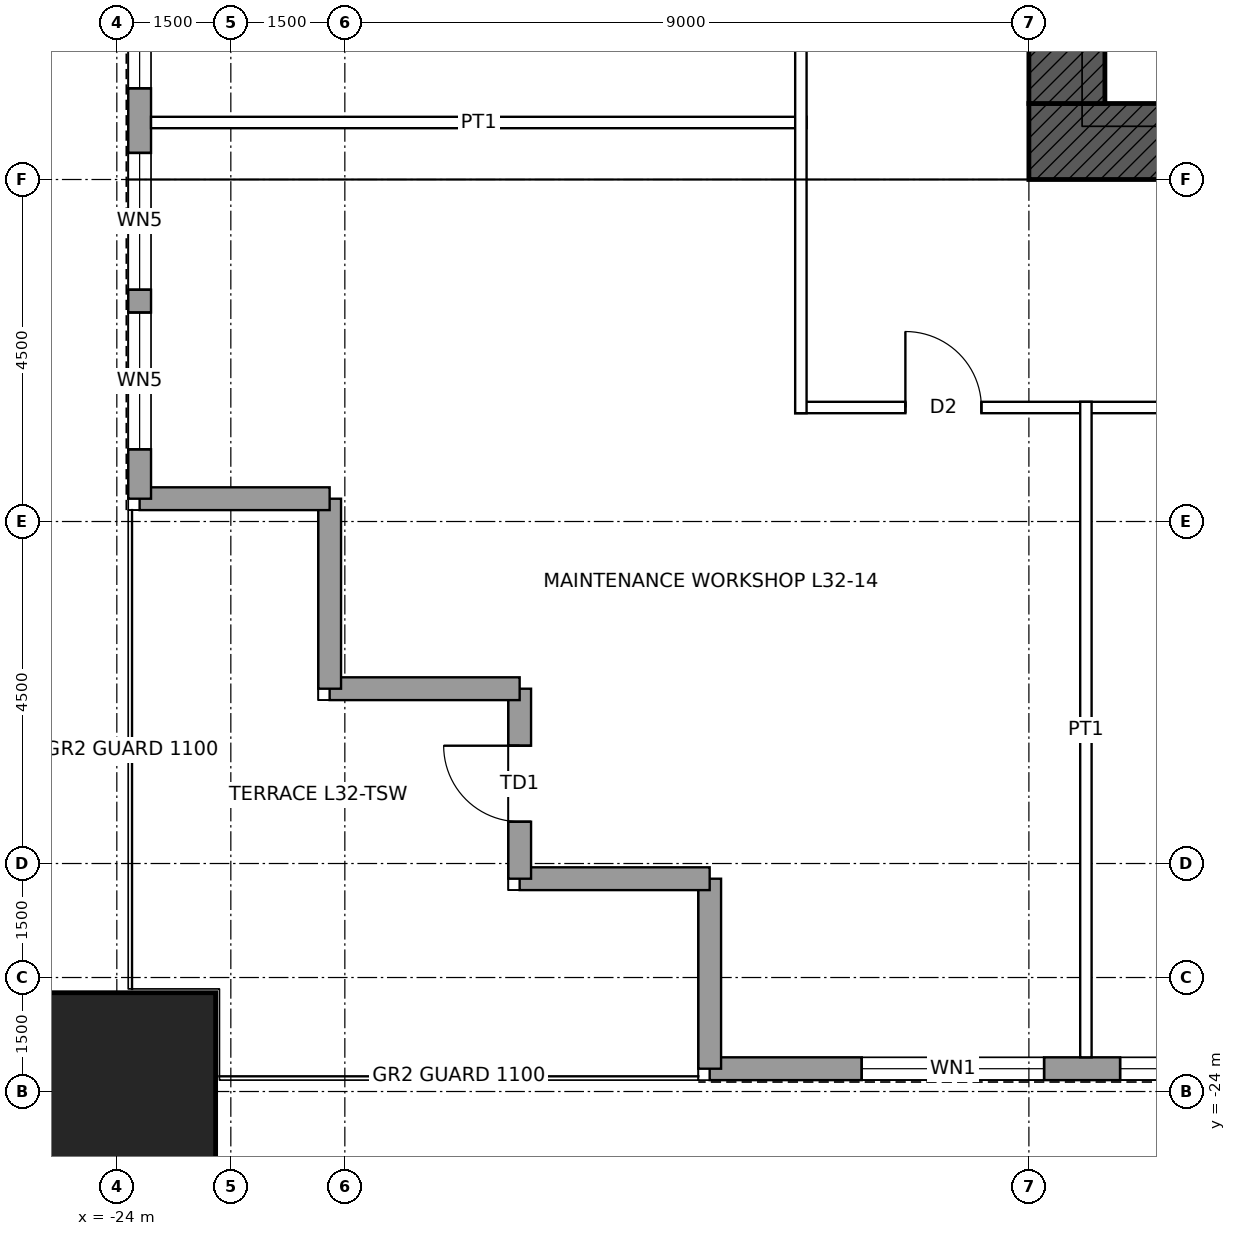
"""IFC4 building model, lengths in metres.
Left out: names, types, materials, properties, quantities, classifications, styles, units other than length and angle.
Written with IfcOpenShell. Run it as: python <this file> out.ifc"""

import sys

from ifc_helpers import new_model, si_unit, direction, frame, frame_2d, origin, origin_2d, place, context, subcontext, project, spatial, rectangle, hollow_rectangle, extrude, element, fill, save


model = new_model("IFC4")
c1 = context("Model", 3, precision=1e-05, world=origin(), true_north=direction((0.0, 1.0)))
c2 = subcontext(c1, "Body", "Model", "MODEL_VIEW")
j1 = project(units=[si_unit("LENGTHUNIT", "METRE"), si_unit("PLANEANGLEUNIT", "RADIAN")], contexts=[c1])
p1 = place(None, origin())
s1 = spatial("IfcSite", under=j1, at=p1, CompositionType="ELEMENT")
p2 = place(p1, origin())
s2 = spatial("IfcBuilding", under=s1, at=p2, CompositionType="ELEMENT")
p3 = place(p2, frame((0.0, 0.0, 158.4)))
s3 = spatial("IfcBuildingStorey", under=s2, at=p3, CompositionType="ELEMENT", Elevation=158.4)
p4 = place(p3, frame((-24.0, -24.0, 0.0), z_axis=(0.0, 0.0, 1.0), x_axis=(1.0, 0.0, 0.0)))
e1 = element("IfcColumn", 1, at=p4, inside=s3, PredefinedType="COLUMN", context=c2, shape_type="SweptSolid", body=[
    extrude(hollow_rectangle(XDim=2.6, YDim=2.6, WallThickness=0.13, at=origin_2d()), origin(), (0.0, 0.0, 1.0), 4.5),
])
p5 = place(p3, frame((12.0, -11.5, 0.0), z_axis=(0.0, 0.0, 1.0), x_axis=(-1.0, 0.0, 0.0)))
e2 = element("IfcWall", 2, at=p5, inside=s3, PredefinedType="SHEAR", context=c2, shape_type="SweptSolid", body=[
    extrude(rectangle(XDim=24.0, YDim=1.0, at=frame_2d((12.0, 0.0))), origin(), (0.0, 0.0, 1.0), 4.5),
])
p6 = place(p5, frame((11.5, 0.0, 0.0)))
e3 = element("IfcOpeningElement", 3, at=p6, cuts=e2, PredefinedType="OPENING", context=c2, shape_type="SweptSolid", body=[
    extrude(rectangle(XDim=1.0, YDim=2.1, at=frame_2d((0.5, 1.05))), frame((0.0, 0.51, 0.0), z_axis=(0.0, -1.0, 0.0), x_axis=(1.0, 0.0, 0.0)), (0.0, 0.0, 1.0), 1.02),
])
p7 = place(p5, frame((1.0, 0.0, 0.0)))
e4 = element("IfcOpeningElement", 4, at=p7, cuts=e2, PredefinedType="OPENING", context=c2, shape_type="SweptSolid", body=[
    extrude(rectangle(XDim=1.0, YDim=2.4, at=frame_2d((0.5, 1.2))), frame((0.0, 0.51, 0.0), z_axis=(0.0, -1.0, 0.0), x_axis=(1.0, 0.0, 0.0)), (0.0, 0.0, 1.0), 1.02),
])
p8 = place(p3, frame((-11.5, -11.0, 0.0), z_axis=(0.0, 0.0, 1.0), x_axis=(0.0, 1.0, 0.0)))
e5 = element("IfcWall", 5, at=p8, inside=s3, PredefinedType="SHEAR", context=c2, shape_type="SweptSolid", body=[
    extrude(rectangle(XDim=22.0, YDim=1.0, at=frame_2d((11.0, 0.0))), origin(), (0.0, 0.0, 1.0), 4.5),
])
p9 = place(p8, frame((10.5, 0.0, 0.0)))
e6 = element("IfcOpeningElement", 6, at=p9, cuts=e5, PredefinedType="OPENING", context=c2, shape_type="SweptSolid", body=[
    extrude(rectangle(XDim=1.0, YDim=2.4, at=frame_2d((0.5, 1.2))), frame((0.0, 0.51, 0.0), z_axis=(0.0, -1.0, 0.0), x_axis=(1.0, 0.0, 0.0)), (0.0, 0.0, 1.0), 1.02),
])
p10 = place(p3, frame((16.2, -23.7, 0.0), z_axis=(0.0, 0.0, 1.0), x_axis=(-1.0, 0.0, 0.0)))
e7 = element("IfcWall", 7, at=p10, inside=s3, PredefinedType="SOLIDWALL", context=c2, shape_type="SweptSolid", body=[
    extrude(rectangle(XDim=32.4, YDim=0.3, at=frame_2d((16.2, 0.0))), origin(), (0.0, 0.0, 1.0), 4.3),
])
p11 = place(p10, frame((0.65, 0.0, 1.0)))
e8 = element("IfcOpeningElement", 8, at=p11, cuts=e7, PredefinedType="OPENING", context=c2, shape_type="SweptSolid", body=[
    extrude(rectangle(XDim=1.8, YDim=1.2, at=frame_2d((0.9, 0.6))), frame((0.0, 0.16, 0.0), z_axis=(0.0, -1.0, 0.0), x_axis=(1.0, 0.0, 0.0)), (0.0, 0.0, 1.0), 0.32),
])
p12 = place(p10, frame((2.75, 0.0, 1.0)))
e9 = element("IfcOpeningElement", 9, at=p12, cuts=e7, PredefinedType="OPENING", context=c2, shape_type="SweptSolid", body=[
    extrude(rectangle(XDim=1.8, YDim=1.2, at=frame_2d((0.9, 0.6))), frame((0.0, 0.16, 0.0), z_axis=(0.0, -1.0, 0.0), x_axis=(1.0, 0.0, 0.0)), (0.0, 0.0, 1.0), 0.32),
])
p13 = place(p10, frame((5.4, 0.0, 1.0)))
e10 = element("IfcOpeningElement", 10, at=p13, cuts=e7, PredefinedType="OPENING", context=c2, shape_type="SweptSolid", body=[
    extrude(rectangle(XDim=2.4, YDim=1.2, at=frame_2d((1.2, 0.6))), frame((0.0, 0.16, 0.0), z_axis=(0.0, -1.0, 0.0), x_axis=(1.0, 0.0, 0.0)), (0.0, 0.0, 1.0), 0.32),
])
p14 = place(p10, frame((12.95, 0.0, 1.0)))
e11 = element("IfcOpeningElement", 11, at=p14, cuts=e7, PredefinedType="OPENING", context=c2, shape_type="SweptSolid", body=[
    extrude(rectangle(XDim=2.4, YDim=1.2, at=frame_2d((1.2, 0.6))), frame((0.0, 0.16, 0.0), z_axis=(0.0, -1.0, 0.0), x_axis=(1.0, 0.0, 0.0)), (0.0, 0.0, 1.0), 0.32),
])
p15 = place(p10, frame((15.65, 0.0, 1.0)))
e12 = element("IfcOpeningElement", 12, at=p15, cuts=e7, PredefinedType="OPENING", context=c2, shape_type="SweptSolid", body=[
    extrude(rectangle(XDim=1.8, YDim=1.2, at=frame_2d((0.9, 0.6))), frame((0.0, 0.16, 0.0), z_axis=(0.0, -1.0, 0.0), x_axis=(1.0, 0.0, 0.0)), (0.0, 0.0, 1.0), 0.32),
])
p16 = place(p10, frame((17.75, 0.0, 1.0)))
e13 = element("IfcOpeningElement", 13, at=p16, cuts=e7, PredefinedType="OPENING", context=c2, shape_type="SweptSolid", body=[
    extrude(rectangle(XDim=1.8, YDim=1.2, at=frame_2d((0.9, 0.6))), frame((0.0, 0.16, 0.0), z_axis=(0.0, -1.0, 0.0), x_axis=(1.0, 0.0, 0.0)), (0.0, 0.0, 1.0), 0.32),
])
p17 = place(p10, frame((24.6, 0.0, 1.0)))
e14 = element("IfcOpeningElement", 14, at=p17, cuts=e7, PredefinedType="OPENING", context=c2, shape_type="SweptSolid", body=[
    extrude(rectangle(XDim=2.4, YDim=1.2, at=frame_2d((1.2, 0.6))), frame((0.0, 0.16, 0.0), z_axis=(0.0, -1.0, 0.0), x_axis=(1.0, 0.0, 0.0)), (0.0, 0.0, 1.0), 0.32),
])
p18 = place(p10, frame((28.0, 0.0, 1.0)))
e15 = element("IfcOpeningElement", 15, at=p18, cuts=e7, PredefinedType="OPENING", context=c2, shape_type="SweptSolid", body=[
    extrude(rectangle(XDim=2.4, YDim=1.2, at=frame_2d((1.2, 0.6))), frame((0.0, 0.16, 0.0), z_axis=(0.0, -1.0, 0.0), x_axis=(1.0, 0.0, 0.0)), (0.0, 0.0, 1.0), 0.32),
])
for number, where, z_axis, x_axis in (
    (16, (-16.2, -23.7, 0.0), (0.0, 0.0, 1.0), (0.0, 1.0, 0.0)),
    (17, (-16.2, -21.2, 0.0), (0.0, 0.0, 1.0), (-1.0, 0.0, 0.0)),
):
    element("IfcWall", number, at=place(p3, frame(where, z_axis=z_axis, x_axis=x_axis)), inside=s3, PredefinedType="SOLIDWALL", context=c2, shape_type="SweptSolid", body=[
        extrude(rectangle(XDim=2.5, YDim=0.3, at=frame_2d((1.25, 0.0))), origin(), (0.0, 0.0, 1.0), 4.3),
    ])
p19 = place(p3, frame((-18.7, -21.2, 0.0), z_axis=(0.0, 0.0, 1.0), x_axis=(0.0, 1.0, 0.0)))
e18 = element("IfcWall", 18, at=p19, inside=s3, PredefinedType="SOLIDWALL", context=c2, shape_type="SweptSolid", body=[
    extrude(rectangle(XDim=2.5, YDim=0.3, at=frame_2d((1.25, 0.0))), origin(), (0.0, 0.0, 1.0), 4.3),
])
p20 = place(p19, frame((0.75, 0.0, 0.0)))
e19 = element("IfcOpeningElement", 19, at=p20, cuts=e18, PredefinedType="OPENING", context=c2, shape_type="SweptSolid", body=[
    extrude(rectangle(XDim=1.0, YDim=2.4, at=frame_2d((0.5, 1.2))), frame((0.0, 0.16, 0.0), z_axis=(0.0, -1.0, 0.0), x_axis=(1.0, 0.0, 0.0)), (0.0, 0.0, 1.0), 0.32),
])
for number, where, z_axis, x_axis in (
    (20, (-18.7, -18.7, 0.0), (0.0, 0.0, 1.0), (-1.0, 0.0, 0.0)),
    (21, (-21.2, -18.7, 0.0), (0.0, 0.0, 1.0), (0.0, 1.0, 0.0)),
    (22, (-21.2, -16.2, 0.0), (0.0, 0.0, 1.0), (-1.0, 0.0, 0.0)),
):
    element("IfcWall", number, at=place(p3, frame(where, z_axis=z_axis, x_axis=x_axis)), inside=s3, PredefinedType="SOLIDWALL", context=c2, shape_type="SweptSolid", body=[
        extrude(rectangle(XDim=2.5, YDim=0.3, at=frame_2d((1.25, 0.0))), origin(), (0.0, 0.0, 1.0), 4.3),
    ])
p21 = place(p3, frame((-23.7, -16.2, 0.0), z_axis=(0.0, 0.0, 1.0), x_axis=(0.0, 1.0, 0.0)))
e23 = element("IfcWall", 23, at=p21, inside=s3, PredefinedType="SOLIDWALL", context=c2, shape_type="SweptSolid", body=[
    extrude(rectangle(XDim=32.4, YDim=0.3, at=frame_2d((16.2, 0.0))), origin(), (0.0, 0.0, 1.0), 4.3),
])
p22 = place(p21, frame((0.65, 0.0, 1.0)))
e24 = element("IfcOpeningElement", 24, at=p22, cuts=e23, PredefinedType="OPENING", context=c2, shape_type="SweptSolid", body=[
    extrude(rectangle(XDim=1.8, YDim=1.2, at=frame_2d((0.9, 0.6))), frame((0.0, 0.16, 0.0), z_axis=(0.0, -1.0, 0.0), x_axis=(1.0, 0.0, 0.0)), (0.0, 0.0, 1.0), 0.32),
])
p23 = place(p21, frame((2.75, 0.0, 1.0)))
e25 = element("IfcOpeningElement", 25, at=p23, cuts=e23, PredefinedType="OPENING", context=c2, shape_type="SweptSolid", body=[
    extrude(rectangle(XDim=1.8, YDim=1.2, at=frame_2d((0.9, 0.6))), frame((0.0, 0.16, 0.0), z_axis=(0.0, -1.0, 0.0), x_axis=(1.0, 0.0, 0.0)), (0.0, 0.0, 1.0), 0.32),
])
p24 = place(p21, frame((5.4, 0.0, 1.0)))
e26 = element("IfcOpeningElement", 26, at=p24, cuts=e23, PredefinedType="OPENING", context=c2, shape_type="SweptSolid", body=[
    extrude(rectangle(XDim=2.4, YDim=1.2, at=frame_2d((1.2, 0.6))), frame((0.0, 0.16, 0.0), z_axis=(0.0, -1.0, 0.0), x_axis=(1.0, 0.0, 0.0)), (0.0, 0.0, 1.0), 0.32),
])
p25 = place(p21, frame((12.95, 0.0, 1.0)))
e27 = element("IfcOpeningElement", 27, at=p25, cuts=e23, PredefinedType="OPENING", context=c2, shape_type="SweptSolid", body=[
    extrude(rectangle(XDim=2.4, YDim=1.2, at=frame_2d((1.2, 0.6))), frame((0.0, 0.16, 0.0), z_axis=(0.0, -1.0, 0.0), x_axis=(1.0, 0.0, 0.0)), (0.0, 0.0, 1.0), 0.32),
])
p26 = place(p21, frame((15.65, 0.0, 1.0)))
e28 = element("IfcOpeningElement", 28, at=p26, cuts=e23, PredefinedType="OPENING", context=c2, shape_type="SweptSolid", body=[
    extrude(rectangle(XDim=1.8, YDim=1.2, at=frame_2d((0.9, 0.6))), frame((0.0, 0.16, 0.0), z_axis=(0.0, -1.0, 0.0), x_axis=(1.0, 0.0, 0.0)), (0.0, 0.0, 1.0), 0.32),
])
p27 = place(p21, frame((17.75, 0.0, 1.0)))
e29 = element("IfcOpeningElement", 29, at=p27, cuts=e23, PredefinedType="OPENING", context=c2, shape_type="SweptSolid", body=[
    extrude(rectangle(XDim=1.8, YDim=1.2, at=frame_2d((0.9, 0.6))), frame((0.0, 0.16, 0.0), z_axis=(0.0, -1.0, 0.0), x_axis=(1.0, 0.0, 0.0)), (0.0, 0.0, 1.0), 0.32),
])
p28 = place(p21, frame((24.6, 0.0, 1.0)))
e30 = element("IfcOpeningElement", 30, at=p28, cuts=e23, PredefinedType="OPENING", context=c2, shape_type="SweptSolid", body=[
    extrude(rectangle(XDim=2.4, YDim=1.2, at=frame_2d((1.2, 0.6))), frame((0.0, 0.16, 0.0), z_axis=(0.0, -1.0, 0.0), x_axis=(1.0, 0.0, 0.0)), (0.0, 0.0, 1.0), 0.32),
])
p29 = place(p21, frame((28.0, 0.0, 1.0)))
e31 = element("IfcOpeningElement", 31, at=p29, cuts=e23, PredefinedType="OPENING", context=c2, shape_type="SweptSolid", body=[
    extrude(rectangle(XDim=2.4, YDim=1.2, at=frame_2d((1.2, 0.6))), frame((0.0, 0.16, 0.0), z_axis=(0.0, -1.0, 0.0), x_axis=(1.0, 0.0, 0.0)), (0.0, 0.0, 1.0), 0.32),
])
p30 = place(p3, frame((-15.075, -15.0, 0.0), z_axis=(0.0, 0.0, 1.0), x_axis=(1.0, 0.0, 0.0)))
e32 = element("IfcWall", 32, at=p30, inside=s3, PredefinedType="PARTITIONING", context=c2, shape_type="SweptSolid", body=[
    extrude(rectangle(XDim=30.15, YDim=0.15, at=frame_2d((15.075, 0.0))), origin(), (0.0, 0.0, 1.0), 4.3),
])
p31 = place(p30, frame((21.675, 0.0, 0.0)))
e33 = element("IfcOpeningElement", 33, at=p31, cuts=e32, PredefinedType="OPENING", context=c2, shape_type="SweptSolid", body=[
    extrude(rectangle(XDim=1.8, YDim=2.4, at=frame_2d((0.9, 1.2))), frame((0.0, 0.085, 0.0), z_axis=(0.0, -1.0, 0.0), x_axis=(1.0, 0.0, 0.0)), (0.0, 0.0, 1.0), 0.17),
])
p32 = place(p30, frame((14.575, 0.0, 0.0)))
e34 = element("IfcOpeningElement", 34, at=p32, cuts=e32, PredefinedType="OPENING", context=c2, shape_type="SweptSolid", body=[
    extrude(rectangle(XDim=1.0, YDim=2.1, at=frame_2d((0.5, 1.05))), frame((0.0, 0.085, 0.0), z_axis=(0.0, -1.0, 0.0), x_axis=(1.0, 0.0, 0.0)), (0.0, 0.0, 1.0), 0.17),
])
p33 = place(p30, frame((6.675, 0.0, 0.0)))
e35 = element("IfcOpeningElement", 35, at=p33, cuts=e32, PredefinedType="OPENING", context=c2, shape_type="SweptSolid", body=[
    extrude(rectangle(XDim=1.8, YDim=2.4, at=frame_2d((0.9, 1.2))), frame((0.0, 0.085, 0.0), z_axis=(0.0, -1.0, 0.0), x_axis=(1.0, 0.0, 0.0)), (0.0, 0.0, 1.0), 0.17),
])
p34 = place(p30, frame((27.7, 0.0, 0.0)))
e36 = element("IfcOpeningElement", 36, at=p34, cuts=e32, PredefinedType="OPENING", context=c2, shape_type="SweptSolid", body=[
    extrude(rectangle(XDim=1.0, YDim=2.1, at=frame_2d((0.5, 1.05))), frame((0.0, 0.085, 0.0), z_axis=(0.0, -1.0, 0.0), x_axis=(1.0, 0.0, 0.0)), (0.0, 0.0, 1.0), 0.17),
])
p35 = place(p30, frame((1.45, 0.0, 0.0)))
e37 = element("IfcOpeningElement", 37, at=p35, cuts=e32, PredefinedType="OPENING", context=c2, shape_type="SweptSolid", body=[
    extrude(rectangle(XDim=1.0, YDim=2.1, at=frame_2d((0.5, 1.05))), frame((0.0, 0.085, 0.0), z_axis=(0.0, -1.0, 0.0), x_axis=(1.0, 0.0, 0.0)), (0.0, 0.0, 1.0), 0.17),
])
p36 = place(p3, frame((-23.55, -11.25, 0.0), z_axis=(0.0, 0.0, 1.0), x_axis=(1.0, 0.0, 0.0)))
e38 = element("IfcWall", 38, at=p36, inside=s3, PredefinedType="PARTITIONING", context=c2, shape_type="SweptSolid", body=[
    extrude(rectangle(XDim=8.625, YDim=0.15, at=frame_2d((4.312, 0.0))), origin(), (0.0, 0.0, 1.0), 3.431),
])
p37 = place(p3, frame((-15.0, -15.075, 0.0), z_axis=(0.0, 0.0, 1.0), x_axis=(0.0, 1.0, 0.0)))
e39 = element("IfcWall", 39, at=p37, inside=s3, PredefinedType="PARTITIONING", context=c2, shape_type="SweptSolid", body=[
    extrude(rectangle(XDim=30.15, YDim=0.15, at=frame_2d((15.075, 0.0))), origin(), (0.0, 0.0, 1.0), 4.3),
])
p38 = place(p37, frame((7.075, 0.0, 0.0)))
e40 = element("IfcOpeningElement", 40, at=p38, cuts=e39, PredefinedType="OPENING", context=c2, shape_type="SweptSolid", body=[
    extrude(rectangle(XDim=1.0, YDim=2.1, at=frame_2d((0.5, 1.05))), frame((0.0, 0.085, 0.0), z_axis=(0.0, -1.0, 0.0), x_axis=(1.0, 0.0, 0.0)), (0.0, 0.0, 1.0), 0.17),
])
p39 = place(p37, frame((14.575, 0.0, 0.0)))
e41 = element("IfcOpeningElement", 41, at=p39, cuts=e39, PredefinedType="OPENING", context=c2, shape_type="SweptSolid", body=[
    extrude(rectangle(XDim=1.0, YDim=2.1, at=frame_2d((0.5, 1.05))), frame((0.0, 0.085, 0.0), z_axis=(0.0, -1.0, 0.0), x_axis=(1.0, 0.0, 0.0)), (0.0, 0.0, 1.0), 0.17),
])
p40 = place(p37, frame((21.675, 0.0, 0.0)))
e42 = element("IfcOpeningElement", 42, at=p40, cuts=e39, PredefinedType="OPENING", context=c2, shape_type="SweptSolid", body=[
    extrude(rectangle(XDim=1.8, YDim=2.4, at=frame_2d((0.9, 1.2))), frame((0.0, 0.085, 0.0), z_axis=(0.0, -1.0, 0.0), x_axis=(1.0, 0.0, 0.0)), (0.0, 0.0, 1.0), 0.17),
])
p41 = place(p3, frame((-11.25, -23.55, 0.0), z_axis=(0.0, 0.0, 1.0), x_axis=(0.0, 1.0, 0.0)))
e43 = element("IfcWall", 43, at=p41, inside=s3, PredefinedType="PARTITIONING", context=c2, shape_type="SweptSolid", body=[
    extrude(rectangle(XDim=8.625, YDim=0.15, at=frame_2d((4.312, 0.0))), origin(), (0.0, 0.0, 1.0), 3.431),
])
p42 = place(p17, origin())
e44 = element("IfcWindow", 44, at=p42, inside=s3, PartitioningType="SINGLE_PANEL", PredefinedType="WINDOW", context=c2, shape_type="SweptSolid", body=[
    extrude(rectangle(XDim=2.4, YDim=1.2, at=frame_2d((1.2, 0.6))), frame((0.0, 0.03, 0.0), z_axis=(0.0, -1.0, 0.0), x_axis=(1.0, 0.0, 0.0)), (0.0, 0.0, 1.0), 0.06),
])
fill(e14, e44)
p43 = place(p18, origin())
e45 = element("IfcWindow", 45, at=p43, inside=s3, PartitioningType="SINGLE_PANEL", PredefinedType="WINDOW", context=c2, shape_type="SweptSolid", body=[
    extrude(rectangle(XDim=2.4, YDim=1.2, at=frame_2d((1.2, 0.6))), frame((0.0, 0.03, 0.0), z_axis=(0.0, -1.0, 0.0), x_axis=(1.0, 0.0, 0.0)), (0.0, 0.0, 1.0), 0.06),
])
fill(e15, e45)
p44 = place(p20, origin())
e46 = element("IfcDoor", 46, at=p44, inside=s3, OperationType="SINGLE_SWING_RIGHT", PredefinedType="DOOR", context=c2, shape_type="SweptSolid", body=[
    extrude(rectangle(XDim=1.0, YDim=2.4, at=frame_2d((0.5, 1.2))), frame((0.0, 0.025, 0.0), z_axis=(0.0, -1.0, 0.0), x_axis=(1.0, 0.0, 0.0)), (0.0, 0.0, 1.0), 0.05),
])
fill(e19, e46)
p45 = place(p22, origin())
e47 = element("IfcWindow", 47, at=p45, inside=s3, PartitioningType="SINGLE_PANEL", PredefinedType="WINDOW", context=c2, shape_type="SweptSolid", body=[
    extrude(rectangle(XDim=1.8, YDim=1.2, at=frame_2d((0.9, 0.6))), frame((0.0, 0.03, 0.0), z_axis=(0.0, -1.0, 0.0), x_axis=(1.0, 0.0, 0.0)), (0.0, 0.0, 1.0), 0.06),
])
fill(e24, e47)
p46 = place(p23, origin())
e48 = element("IfcWindow", 48, at=p46, inside=s3, PartitioningType="SINGLE_PANEL", PredefinedType="WINDOW", context=c2, shape_type="SweptSolid", body=[
    extrude(rectangle(XDim=1.8, YDim=1.2, at=frame_2d((0.9, 0.6))), frame((0.0, 0.03, 0.0), z_axis=(0.0, -1.0, 0.0), x_axis=(1.0, 0.0, 0.0)), (0.0, 0.0, 1.0), 0.06),
])
fill(e25, e48)
p47 = place(p24, origin())
e49 = element("IfcWindow", 49, at=p47, inside=s3, PartitioningType="SINGLE_PANEL", PredefinedType="WINDOW", context=c2, shape_type="SweptSolid", body=[
    extrude(rectangle(XDim=2.4, YDim=1.2, at=frame_2d((1.2, 0.6))), frame((0.0, 0.03, 0.0), z_axis=(0.0, -1.0, 0.0), x_axis=(1.0, 0.0, 0.0)), (0.0, 0.0, 1.0), 0.06),
])
fill(e26, e49)
p48 = place(p35, origin())
e50 = element("IfcDoor", 50, at=p48, inside=s3, OperationType="SINGLE_SWING_LEFT", PredefinedType="DOOR", context=c2, shape_type="SweptSolid", body=[
    extrude(rectangle(XDim=1.0, YDim=2.1, at=frame_2d((0.5, 1.05))), frame((0.0, 0.025, 0.0), z_axis=(0.0, -1.0, 0.0), x_axis=(1.0, 0.0, 0.0)), (0.0, 0.0, 1.0), 0.05),
])
fill(e37, e50)
save(model, sys.argv[1])
